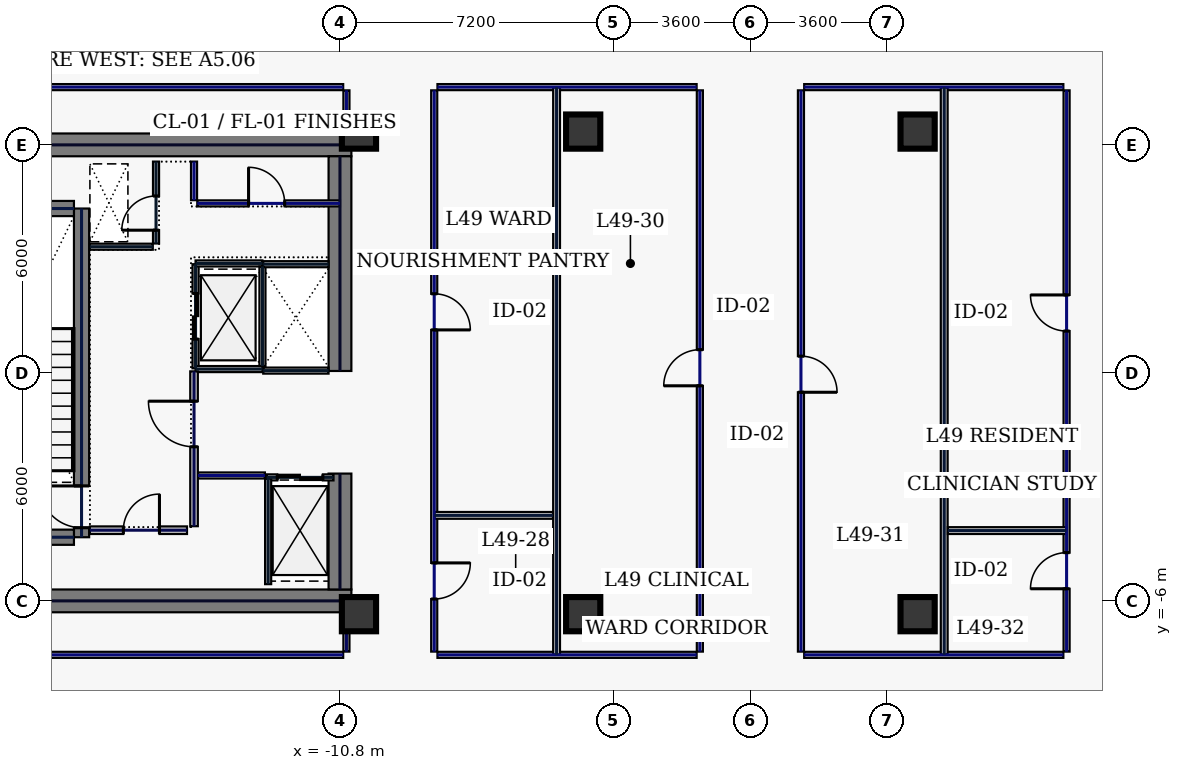
"""IFC4 building model, lengths in metres.
Left out: names, types, materials, properties, quantities, classifications, styles, units other than length and angle.
Written with IfcOpenShell. Run it as: python <this file> out.ifc"""

import sys

from ifc_helpers import new_model, si_unit, direction, frame, frame_2d, origin, origin_2d, place, context, subcontext, project, spatial, rectangle, hollow_rectangle, extrude, element, fill, save


model = new_model("IFC4")
c1 = context("Model", 3, precision=1e-05, world=origin(), true_north=direction((0.0, 1.0)))
c2 = subcontext(c1, "Body", "Model", "MODEL_VIEW")
j1 = project(units=[si_unit("LENGTHUNIT", "METRE"), si_unit("PLANEANGLEUNIT", "RADIAN")], contexts=[c1])
p1 = place(None, origin())
s1 = spatial("IfcSite", under=j1, at=p1, CompositionType="ELEMENT")
p2 = place(p1, origin())
s2 = spatial("IfcBuilding", under=s1, at=p2, CompositionType="ELEMENT")
p3 = place(p2, frame((0.0, 0.0, 214.2)))
s3 = spatial("IfcBuildingStorey", under=s2, at=p3, CompositionType="ELEMENT", Elevation=214.2)
for number, where, z_axis, x_axis in (
    (1, (-22.0, 6.0, 0.0), (0.0, 0.0, 1.0), (1.0, 0.0, 0.0)),
    (2, (-22.0, -6.0, 0.0), (0.0, 0.0, 1.0), (1.0, 0.0, 0.0)),
):
    element("IfcWall", number, at=place(p3, frame(where, z_axis=z_axis, x_axis=x_axis)), inside=s3, PredefinedType="SHEAR", context=c2, shape_type="SweptSolid", body=[
        extrude(rectangle(XDim=11.5, YDim=0.6, at=frame_2d((5.75, 0.0))), origin(), (0.0, 0.0, 1.0), 3.74),
    ])
p4 = place(p3, frame((-10.8, -5.7, 0.0), z_axis=(0.0, 0.0, 1.0), x_axis=(0.0, 1.0, 0.0)))
e3 = element("IfcWall", 3, at=p4, inside=s3, PredefinedType="SHEAR", context=c2, shape_type="SweptSolid", body=[
    extrude(rectangle(XDim=3.05, YDim=0.6, at=frame_2d((1.525, 0.0))), origin(), (0.0, 0.0, 1.0), 3.74),
])
p5 = place(p3, frame((-10.8, 0.05, 0.0), z_axis=(0.0, 0.0, 1.0), x_axis=(0.0, 1.0, 0.0)))
e4 = element("IfcWall", 4, at=p5, inside=s3, PredefinedType="SHEAR", context=c2, shape_type="SweptSolid", body=[
    extrude(rectangle(XDim=5.65, YDim=0.6, at=frame_2d((2.825, 0.0))), origin(), (0.0, 0.0, 1.0), 3.74),
])
p6 = place(p3, frame((-17.6, -4.325, 0.0), z_axis=(0.0, 0.0, 1.0), x_axis=(0.0, 1.0, 0.0)))
e5 = element("IfcWall", 5, at=p6, inside=s3, PredefinedType="SHEAR", context=c2, shape_type="SweptSolid", body=[
    extrude(rectangle(XDim=8.65, YDim=0.4, at=frame_2d((4.325, 0.0))), origin(), (0.0, 0.0, 1.0), 3.74),
])
p7 = place(p6, frame((0.25, 0.0, 0.0)))
e6 = element("IfcOpeningElement", 6, at=p7, cuts=e5, PredefinedType="OPENING", context=c2, shape_type="SweptSolid", body=[
    extrude(rectangle(XDim=1.1, YDim=2.2, at=frame_2d((0.55, 1.1))), frame((0.0, 0.21, 0.0), z_axis=(0.0, -1.0, 0.0), x_axis=(1.0, 0.0, 0.0)), (0.0, 0.0, 1.0), 0.42),
])
for number, where, z_axis, x_axis in (
    (7, (-21.2, -4.325, 0.0), (0.0, 0.0, 1.0), (1.0, 0.0, 0.0)),
    (8, (-21.2, 4.325, 0.0), (0.0, 0.0, 1.0), (1.0, 0.0, 0.0)),
):
    element("IfcWall", number, at=place(p3, frame(where, z_axis=z_axis, x_axis=x_axis)), inside=s3, PredefinedType="SHEAR", context=c2, shape_type="SweptSolid", body=[
        extrude(rectangle(XDim=3.4, YDim=0.4, at=frame_2d((1.7, 0.0))), origin(), (0.0, 0.0, 1.0), 3.74),
    ])
for number, where, z_axis, x_axis in (
    (9, (-10.3, -6.35, 0.0), (0.0, 0.0, 1.0), (1.0, 0.0, 0.0)),
    (10, (-10.3, 6.35, 0.0), (0.0, 0.0, 1.0), (1.0, 0.0, 0.0)),
    (11, (-4.4, -6.35, 0.0), (0.0, 0.0, 1.0), (1.0, 0.0, 0.0)),
    (12, (4.4, -6.35, 0.0), (0.0, 0.0, 1.0), (1.0, 0.0, 0.0)),
    (13, (-4.4, 6.35, 0.0), (0.0, 0.0, 1.0), (1.0, 0.0, 0.0)),
    (14, (4.4, 6.35, 0.0), (0.0, 0.0, 1.0), (1.0, 0.0, 0.0)),
):
    element("IfcColumn", number, at=place(p3, frame(where, z_axis=z_axis, x_axis=x_axis)), inside=s3, PredefinedType="COLUMN", context=c2, shape_type="SweptSolid", body=[
        extrude(hollow_rectangle(XDim=0.9, YDim=0.9, WallThickness=0.04, at=origin_2d()), origin(), (0.0, 0.0, 1.0), 3.74),
    ])
p8 = place(p3, frame((-14.6, 0.12, 0.0), z_axis=(0.0, 0.0, 1.0), x_axis=(0.0, 1.0, 0.0)))
e15 = element("IfcWall", 15, at=p8, inside=s3, PredefinedType="PARTITIONING", context=c2, shape_type="SweptSolid", body=[
    extrude(rectangle(XDim=2.74, YDim=0.16, at=frame_2d((1.37, 0.0))), origin(), (0.0, 0.0, 1.0), 3.74),
])
p9 = place(p8, frame((0.77, 0.0, 0.0)))
e16 = element("IfcOpeningElement", 16, at=p9, cuts=e15, PredefinedType="OPENING", context=c2, shape_type="SweptSolid", body=[
    extrude(rectangle(XDim=1.2, YDim=2.2, at=frame_2d((0.6, 1.1))), frame((0.0, 0.09, 0.0), z_axis=(0.0, -1.0, 0.0), x_axis=(1.0, 0.0, 0.0)), (0.0, 0.0, 1.0), 0.18),
])
for number, where, z_axis, x_axis in (
    (17, (-14.6, 0.1, 0.0), (0.0, 0.0, 1.0), (1.0, 0.0, 0.0)),
    (18, (-14.6, 2.88, 0.0), (0.0, 0.0, 1.0), (1.0, 0.0, 0.0)),
):
    element("IfcWall", number, at=place(p3, frame(where, z_axis=z_axis, x_axis=x_axis)), inside=s3, PredefinedType="PARTITIONING", context=c2, shape_type="SweptSolid", body=[
        extrude(rectangle(XDim=1.76, YDim=0.16, at=frame_2d((0.88, 0.0))), origin(), (0.0, 0.0, 1.0), 3.74),
    ])
p10 = place(p3, frame((-12.84, 0.18, 0.0), z_axis=(0.0, 0.0, 1.0), x_axis=(0.0, 1.0, 0.0)))
e19 = element("IfcWall", 19, at=p10, inside=s3, PredefinedType="PARTITIONING", context=c2, shape_type="SweptSolid", body=[
    extrude(rectangle(XDim=2.62, YDim=0.16, at=frame_2d((1.31, 0.0))), origin(), (0.0, 0.0, 1.0), 3.74),
])
p11 = place(p3, frame((-12.73, -2.75, 0.0), z_axis=(0.0, 0.0, 1.0), x_axis=(1.0, 0.0, 0.0)))
e20 = element("IfcWall", 20, at=p11, inside=s3, PredefinedType="PARTITIONING", context=c2, shape_type="SweptSolid", body=[
    extrude(rectangle(XDim=1.76, YDim=0.16, at=frame_2d((0.88, 0.0))), origin(), (0.0, 0.0, 1.0), 3.74),
])
p12 = place(p11, frame((0.28, 0.0, 0.0)))
e21 = element("IfcOpeningElement", 21, at=p12, cuts=e20, PredefinedType="OPENING", context=c2, shape_type="SweptSolid", body=[
    extrude(rectangle(XDim=1.2, YDim=2.2, at=frame_2d((0.6, 1.1))), frame((0.0, 0.09, 0.0), z_axis=(0.0, -1.0, 0.0), x_axis=(1.0, 0.0, 0.0)), (0.0, 0.0, 1.0), 0.18),
])
for number, where, z_axis, x_axis in (
    (22, (-12.82, 0.06, 0.0), (0.0, 0.0, 1.0), (1.0, 0.0, 0.0)),
    (23, (-12.82, 2.86, 0.0), (0.0, 0.0, 1.0), (1.0, 0.0, 0.0)),
):
    element("IfcWall", number, at=place(p3, frame(where, z_axis=z_axis, x_axis=x_axis)), inside=s3, PredefinedType="PARTITIONING", context=c2, shape_type="SweptSolid", body=[
        extrude(rectangle(XDim=1.72, YDim=0.16, at=frame_2d((0.86, 0.0))), origin(), (0.0, 0.0, 1.0), 3.74),
    ])
p13 = place(p3, frame((-15.64, 3.405, 0.0), z_axis=(0.0, 0.0, 1.0), x_axis=(0.0, 1.0, 0.0)))
e24 = element("IfcWall", 24, at=p13, inside=s3, PredefinedType="PARTITIONING", context=c2, shape_type="SweptSolid", body=[
    extrude(rectangle(XDim=2.155, YDim=0.16, at=frame_2d((1.078, 0.0))), origin(), (0.0, 0.0, 1.0), 3.74),
])
p14 = place(p13, frame((0.35, 0.0, 0.0)))
e25 = element("IfcOpeningElement", 25, at=p14, cuts=e24, PredefinedType="OPENING", context=c2, shape_type="SweptSolid", body=[
    extrude(rectangle(XDim=0.9, YDim=2.2, at=frame_2d((0.45, 1.1))), frame((0.0, 0.09, 0.0), z_axis=(0.0, -1.0, 0.0), x_axis=(1.0, 0.0, 0.0)), (0.0, 0.0, 1.0), 0.18),
])
p15 = place(p3, frame((-17.38, 3.32, 0.0), z_axis=(0.0, 0.0, 1.0), x_axis=(1.0, 0.0, 0.0)))
e26 = element("IfcWall", 26, at=p15, inside=s3, PredefinedType="PARTITIONING", context=c2, shape_type="SweptSolid", body=[
    extrude(rectangle(XDim=1.655, YDim=0.16, at=frame_2d((0.827, 0.0))), origin(), (0.0, 0.0, 1.0), 3.74),
])
p16 = place(p3, frame((-17.38, -4.14, 0.0), z_axis=(0.0, 0.0, 1.0), x_axis=(1.0, 0.0, 0.0)))
e27 = element("IfcWall", 27, at=p16, inside=s3, PredefinedType="SOLIDWALL", context=c2, shape_type="SweptSolid", body=[
    extrude(rectangle(XDim=2.555, YDim=0.2, at=frame_2d((1.277, 0.0))), origin(), (0.0, 0.0, 1.0), 3.74),
])
p17 = place(p16, frame((0.88, 0.0, 0.0)))
e28 = element("IfcOpeningElement", 28, at=p17, cuts=e27, PredefinedType="OPENING", context=c2, shape_type="SweptSolid", body=[
    extrude(rectangle(XDim=0.95, YDim=2.2, at=frame_2d((0.475, 1.1))), frame((0.0, 0.11, 0.0), z_axis=(0.0, -1.0, 0.0), x_axis=(1.0, 0.0, 0.0)), (0.0, 0.0, 1.0), 0.22),
])
p18 = place(p3, frame((-14.535, -2.7, 0.0), z_axis=(0.0, 0.0, 1.0), x_axis=(1.0, 0.0, 0.0)))
e29 = element("IfcWall", 29, at=p18, inside=s3, PredefinedType="PARTITIONING", context=c2, shape_type="SweptSolid", body=[
    extrude(rectangle(XDim=1.76, YDim=0.16, at=frame_2d((0.88, 0.0))), origin(), (0.0, 0.0, 1.0), 3.74),
])
p19 = place(p3, frame((-12.69, -5.56, 0.0), z_axis=(0.0, 0.0, 1.0), x_axis=(0.0, 1.0, 0.0)))
e30 = element("IfcWall", 30, at=p19, inside=s3, PredefinedType="PARTITIONING", context=c2, shape_type="SweptSolid", body=[
    extrude(rectangle(XDim=2.775, YDim=0.16, at=frame_2d((1.388, 0.0))), origin(), (0.0, 0.0, 1.0), 3.74),
])
p20 = place(p3, frame((-14.555, 4.46, 0.0), z_axis=(0.0, 0.0, 1.0), x_axis=(1.0, 0.0, 0.0)))
e31 = element("IfcWall", 31, at=p20, inside=s3, PredefinedType="PARTITIONING", context=c2, shape_type="SweptSolid", body=[
    extrude(rectangle(XDim=3.755, YDim=0.16, at=frame_2d((1.877, 0.0))), origin(), (0.0, 0.0, 1.0), 3.74),
])
p21 = place(p20, frame((1.35, 0.0, 0.0)))
e32 = element("IfcOpeningElement", 32, at=p21, cuts=e31, PredefinedType="OPENING", context=c2, shape_type="SweptSolid", body=[
    extrude(rectangle(XDim=0.95, YDim=2.2, at=frame_2d((0.475, 1.1))), frame((0.0, 0.09, 0.0), z_axis=(0.0, -1.0, 0.0), x_axis=(1.0, 0.0, 0.0)), (0.0, 0.0, 1.0), 0.18),
])
p22 = place(p3, frame((-14.64, 4.545, 0.0), z_axis=(0.0, 0.0, 1.0), x_axis=(0.0, 1.0, 0.0)))
e33 = element("IfcWall", 33, at=p22, inside=s3, PredefinedType="PARTITIONING", context=c2, shape_type="SweptSolid", body=[
    extrude(rectangle(XDim=1.015, YDim=0.16, at=frame_2d((0.508, 0.0))), origin(), (0.0, 0.0, 1.0), 3.74),
])
p23 = place(p3, frame((-14.64, -4.035, 0.0), z_axis=(0.0, 0.0, 1.0), x_axis=(0.0, 1.0, 0.0)))
e34 = element("IfcWall", 34, at=p23, inside=s3, PredefinedType="SOLIDWALL", context=c2, shape_type="SweptSolid", body=[
    extrude(rectangle(XDim=4.075, YDim=0.2, at=frame_2d((2.038, 0.0))), origin(), (0.0, 0.0, 1.0), 3.74),
])
p24 = place(p23, frame((2.09, 0.0, 0.0)))
e35 = element("IfcOpeningElement", 35, at=p24, cuts=e34, PredefinedType="OPENING", context=c2, shape_type="SweptSolid", body=[
    extrude(rectangle(XDim=1.2, YDim=2.2, at=frame_2d((0.6, 1.1))), frame((0.0, 0.11, 0.0), z_axis=(0.0, -1.0, 0.0), x_axis=(1.0, 0.0, 0.0)), (0.0, 0.0, 1.0), 0.22),
])
p25 = place(p3, frame((-24.815, -7.42, 0.0), z_axis=(0.0, 0.0, 1.0), x_axis=(1.0, 0.0, 0.0)))
e36 = element("IfcWall", 36, at=p25, inside=s3, PredefinedType="PARTITIONING", context=c2, shape_type="SweptSolid", body=[
    extrude(rectangle(XDim=14.1, YDim=0.16, at=frame_2d((7.05, 0.0))), origin(), (0.0, 0.0, 1.0), 3.74),
])
p26 = place(p3, frame((-10.63, -7.335, 0.0), z_axis=(0.0, 0.0, 1.0), x_axis=(0.0, 1.0, 0.0)))
e37 = element("IfcWall", 37, at=p26, inside=s3, PredefinedType="PARTITIONING", context=c2, shape_type="SweptSolid", body=[
    extrude(rectangle(XDim=0.915, YDim=0.16, at=frame_2d((0.458, 0.0))), origin(), (0.0, 0.0, 1.0), 1.535),
])
p27 = place(p3, frame((-10.63, 6.42, 0.0), z_axis=(0.0, 0.0, 1.0), x_axis=(0.0, 1.0, 0.0)))
e38 = element("IfcWall", 38, at=p27, inside=s3, PredefinedType="PARTITIONING", context=c2, shape_type="SweptSolid", body=[
    extrude(rectangle(XDim=1.015, YDim=0.16, at=frame_2d((0.508, 0.0))), origin(), (0.0, 0.0, 1.0), 3.74),
])
p28 = place(p3, frame((-10.715, 7.52, 0.0), z_axis=(0.0, 0.0, 1.0), x_axis=(-1.0, 0.0, 0.0)))
e39 = element("IfcWall", 39, at=p28, inside=s3, PredefinedType="PARTITIONING", context=c2, shape_type="SweptSolid", body=[
    extrude(rectangle(XDim=14.1, YDim=0.16, at=frame_2d((7.05, 0.0))), origin(), (0.0, 0.0, 1.0), 3.74),
])
p29 = place(p3, frame((8.235, 7.52, 0.0), z_axis=(0.0, 0.0, 1.0), x_axis=(-1.0, 0.0, 0.0)))
e40 = element("IfcWall", 40, at=p29, inside=s3, PredefinedType="PARTITIONING", context=c2, shape_type="SweptSolid", body=[
    extrude(rectangle(XDim=6.82, YDim=0.16, at=frame_2d((3.41, 0.0))), origin(), (0.0, 0.0, 1.0), 3.74),
])
p30 = place(p3, frame((1.33, 7.435, 0.0), z_axis=(0.0, 0.0, 1.0), x_axis=(0.0, -1.0, 0.0)))
e41 = element("IfcWall", 41, at=p30, inside=s3, PredefinedType="PARTITIONING", context=c2, shape_type="SweptSolid", body=[
    extrude(rectangle(XDim=14.77, YDim=0.16, at=frame_2d((7.385, 0.0))), origin(), (0.0, 0.0, 1.0), 3.74),
])
p31 = place(p30, frame((6.995, 0.0, 0.0)))
e42 = element("IfcOpeningElement", 42, at=p31, cuts=e41, PredefinedType="OPENING", context=c2, shape_type="SweptSolid", body=[
    extrude(rectangle(XDim=0.95, YDim=2.2, at=frame_2d((0.475, 1.1))), frame((0.0, 0.09, 0.0), z_axis=(0.0, -1.0, 0.0), x_axis=(1.0, 0.0, 0.0)), (0.0, 0.0, 1.0), 0.18),
])
p32 = place(p3, frame((1.415, -7.42, 0.0), z_axis=(0.0, 0.0, 1.0), x_axis=(1.0, 0.0, 0.0)))
e43 = element("IfcWall", 43, at=p32, inside=s3, PredefinedType="PARTITIONING", context=c2, shape_type="SweptSolid", body=[
    extrude(rectangle(XDim=6.82, YDim=0.16, at=frame_2d((3.41, 0.0))), origin(), (0.0, 0.0, 1.0), 3.74),
])
p33 = place(p3, frame((8.32, -7.335, 0.0), z_axis=(0.0, 0.0, 1.0), x_axis=(0.0, 1.0, 0.0)))
e44 = element("IfcWall", 44, at=p33, inside=s3, PredefinedType="PARTITIONING", context=c2, shape_type="SweptSolid", body=[
    extrude(rectangle(XDim=14.77, YDim=0.16, at=frame_2d((7.385, 0.0))), origin(), (0.0, 0.0, 1.0), 3.74),
])
p34 = place(p33, frame((1.654, 0.0, 0.0)))
e45 = element("IfcOpeningElement", 45, at=p34, cuts=e44, PredefinedType="OPENING", context=c2, shape_type="SweptSolid", body=[
    extrude(rectangle(XDim=0.95, YDim=2.2, at=frame_2d((0.475, 1.1))), frame((0.0, 0.09, 0.0), z_axis=(0.0, -1.0, 0.0), x_axis=(1.0, 0.0, 0.0)), (0.0, 0.0, 1.0), 0.18),
])
p35 = place(p33, frame((8.436, 0.0, 0.0)))
e46 = element("IfcOpeningElement", 46, at=p35, cuts=e44, PredefinedType="OPENING", context=c2, shape_type="SweptSolid", body=[
    extrude(rectangle(XDim=0.95, YDim=2.2, at=frame_2d((0.475, 1.1))), frame((0.0, 0.09, 0.0), z_axis=(0.0, -1.0, 0.0), x_axis=(1.0, 0.0, 0.0)), (0.0, 0.0, 1.0), 0.18),
])
p36 = place(p3, frame((-1.33, -7.335, 0.0), z_axis=(0.0, 0.0, 1.0), x_axis=(0.0, 1.0, 0.0)))
e47 = element("IfcWall", 47, at=p36, inside=s3, PredefinedType="PARTITIONING", context=c2, shape_type="SweptSolid", body=[
    extrude(rectangle(XDim=14.77, YDim=0.16, at=frame_2d((7.385, 0.0))), origin(), (0.0, 0.0, 1.0), 3.74),
])
p37 = place(p36, frame((6.995, 0.0, 0.0)))
e48 = element("IfcOpeningElement", 48, at=p37, cuts=e47, PredefinedType="OPENING", context=c2, shape_type="SweptSolid", body=[
    extrude(rectangle(XDim=0.95, YDim=2.2, at=frame_2d((0.475, 1.1))), frame((0.0, 0.09, 0.0), z_axis=(0.0, -1.0, 0.0), x_axis=(1.0, 0.0, 0.0)), (0.0, 0.0, 1.0), 0.18),
])
p38 = place(p3, frame((-1.415, 7.52, 0.0), z_axis=(0.0, 0.0, 1.0), x_axis=(-1.0, 0.0, 0.0)))
e49 = element("IfcWall", 49, at=p38, inside=s3, PredefinedType="PARTITIONING", context=c2, shape_type="SweptSolid", body=[
    extrude(rectangle(XDim=6.82, YDim=0.16, at=frame_2d((3.41, 0.0))), origin(), (0.0, 0.0, 1.0), 3.74),
])
p39 = place(p3, frame((-8.32, 7.435, 0.0), z_axis=(0.0, 0.0, 1.0), x_axis=(0.0, -1.0, 0.0)))
e50 = element("IfcWall", 50, at=p39, inside=s3, PredefinedType="PARTITIONING", context=c2, shape_type="SweptSolid", body=[
    extrude(rectangle(XDim=14.77, YDim=0.16, at=frame_2d((7.385, 0.0))), origin(), (0.0, 0.0, 1.0), 3.74),
])
p40 = place(p39, frame((12.436, 0.0, 0.0)))
e51 = element("IfcOpeningElement", 51, at=p40, cuts=e50, PredefinedType="OPENING", context=c2, shape_type="SweptSolid", body=[
    extrude(rectangle(XDim=0.95, YDim=2.2, at=frame_2d((0.475, 1.1))), frame((0.0, 0.09, 0.0), z_axis=(0.0, -1.0, 0.0), x_axis=(1.0, 0.0, 0.0)), (0.0, 0.0, 1.0), 0.18),
])
p41 = place(p39, frame((5.354, 0.0, 0.0)))
e52 = element("IfcOpeningElement", 52, at=p41, cuts=e50, PredefinedType="OPENING", context=c2, shape_type="SweptSolid", body=[
    extrude(rectangle(XDim=0.95, YDim=2.2, at=frame_2d((0.475, 1.1))), frame((0.0, 0.09, 0.0), z_axis=(0.0, -1.0, 0.0), x_axis=(1.0, 0.0, 0.0)), (0.0, 0.0, 1.0), 0.18),
])
p42 = place(p3, frame((-8.235, -7.42, 0.0), z_axis=(0.0, 0.0, 1.0), x_axis=(1.0, 0.0, 0.0)))
e53 = element("IfcWall", 53, at=p42, inside=s3, PredefinedType="PARTITIONING", context=c2, shape_type="SweptSolid", body=[
    extrude(rectangle(XDim=6.82, YDim=0.16, at=frame_2d((3.41, 0.0))), origin(), (0.0, 0.0, 1.0), 3.74),
])
for number, where, z_axis, x_axis in (
    (54, (-5.1, -7.415, 0.0), (0.0, 0.0, 1.0), (0.0, 1.0, 0.0)),
    (55, (5.1, -7.415, 0.0), (0.0, 0.0, 1.0), (0.0, 1.0, 0.0)),
):
    element("IfcWall", number, at=place(p3, frame(where, z_axis=z_axis, x_axis=x_axis)), inside=s3, PredefinedType="PARTITIONING", context=c2, shape_type="SweptSolid", body=[
        extrude(rectangle(XDim=14.93, YDim=0.18, at=frame_2d((7.465, 0.0))), origin(), (0.0, 0.0, 1.0), 3.74),
    ])
for number, where, z_axis, x_axis in (
    (56, (-8.315, -3.75, 0.0), (0.0, 0.0, 1.0), (1.0, 0.0, 0.0)),
    (57, (5.195, -4.15, 0.0), (0.0, 0.0, 1.0), (1.0, 0.0, 0.0)),
):
    element("IfcWall", number, at=place(p3, frame(where, z_axis=z_axis, x_axis=x_axis)), inside=s3, PredefinedType="PARTITIONING", context=c2, shape_type="SweptSolid", body=[
        extrude(rectangle(XDim=3.12, YDim=0.18, at=frame_2d((1.56, 0.0))), origin(), (0.0, 0.0, 1.0), 3.74),
    ])
p43 = place(p7, origin())
e58 = element("IfcDoor", 58, at=p43, inside=s3, OperationType="SINGLE_SWING_RIGHT", PredefinedType="DOOR", context=c2, shape_type="SweptSolid", body=[
    extrude(rectangle(XDim=1.1, YDim=2.2, at=frame_2d((0.55, 1.1))), frame((0.0, 0.025, 0.0), z_axis=(0.0, -1.0, 0.0), x_axis=(1.0, 0.0, 0.0)), (0.0, 0.0, 1.0), 0.05),
])
fill(e6, e58)
p44 = place(p9, origin())
e59 = element("IfcDoor", 59, at=p44, inside=s3, OperationType="SLIDING_TO_LEFT", PredefinedType="DOOR", context=c2, shape_type="SweptSolid", body=[
    extrude(rectangle(XDim=1.2, YDim=2.2, at=frame_2d((0.6, 1.1))), frame((0.0, 0.025, 0.0), z_axis=(0.0, -1.0, 0.0), x_axis=(1.0, 0.0, 0.0)), (0.0, 0.0, 1.0), 0.05),
])
fill(e16, e59)
p45 = place(p12, origin())
e60 = element("IfcDoor", 60, at=p45, inside=s3, OperationType="SLIDING_TO_LEFT", PredefinedType="DOOR", context=c2, shape_type="SweptSolid", body=[
    extrude(rectangle(XDim=1.2, YDim=2.2, at=frame_2d((0.6, 1.1))), frame((0.0, 0.025, 0.0), z_axis=(0.0, -1.0, 0.0), x_axis=(1.0, 0.0, 0.0)), (0.0, 0.0, 1.0), 0.05),
])
fill(e21, e60)
p46 = place(p14, origin())
e61 = element("IfcDoor", 61, at=p46, inside=s3, OperationType="SINGLE_SWING_LEFT", PredefinedType="DOOR", context=c2, shape_type="SweptSolid", body=[
    extrude(rectangle(XDim=0.9, YDim=2.2, at=frame_2d((0.45, 1.1))), frame((0.0, 0.025, 0.0), z_axis=(0.0, -1.0, 0.0), x_axis=(1.0, 0.0, 0.0)), (0.0, 0.0, 1.0), 0.05),
])
fill(e25, e61)
p47 = place(p17, origin())
e62 = element("IfcDoor", 62, at=p47, inside=s3, OperationType="SINGLE_SWING_RIGHT", PredefinedType="DOOR", context=c2, shape_type="SweptSolid", body=[
    extrude(rectangle(XDim=0.95, YDim=2.2, at=frame_2d((0.475, 1.1))), frame((0.0, 0.025, 0.0), z_axis=(0.0, -1.0, 0.0), x_axis=(1.0, 0.0, 0.0)), (0.0, 0.0, 1.0), 0.05),
])
fill(e28, e62)
p48 = place(p21, origin())
e63 = element("IfcDoor", 63, at=p48, inside=s3, OperationType="SINGLE_SWING_LEFT", PredefinedType="DOOR", context=c2, shape_type="SweptSolid", body=[
    extrude(rectangle(XDim=0.95, YDim=2.2, at=frame_2d((0.475, 1.1))), frame((0.0, 0.025, 0.0), z_axis=(0.0, -1.0, 0.0), x_axis=(1.0, 0.0, 0.0)), (0.0, 0.0, 1.0), 0.05),
])
fill(e32, e63)
p49 = place(p24, origin())
e64 = element("IfcDoor", 64, at=p49, inside=s3, OperationType="SINGLE_SWING_RIGHT", PredefinedType="DOOR", context=c2, shape_type="SweptSolid", body=[
    extrude(rectangle(XDim=1.2, YDim=2.2, at=frame_2d((0.6, 1.1))), frame((0.0, 0.025, 0.0), z_axis=(0.0, -1.0, 0.0), x_axis=(1.0, 0.0, 0.0)), (0.0, 0.0, 1.0), 0.05),
])
fill(e35, e64)
p50 = place(p40, origin())
e65 = element("IfcDoor", 65, at=p50, inside=s3, OperationType="SINGLE_SWING_LEFT", PredefinedType="DOOR", context=c2, shape_type="SweptSolid", body=[
    extrude(rectangle(XDim=0.95, YDim=2.2, at=frame_2d((0.475, 1.1))), frame((0.0, 0.025, 0.0), z_axis=(0.0, -1.0, 0.0), x_axis=(1.0, 0.0, 0.0)), (0.0, 0.0, 1.0), 0.05),
])
fill(e51, e65)
p51 = place(p41, origin())
e66 = element("IfcDoor", 66, at=p51, inside=s3, OperationType="SINGLE_SWING_RIGHT", PredefinedType="DOOR", context=c2, shape_type="SweptSolid", body=[
    extrude(rectangle(XDim=0.95, YDim=2.2, at=frame_2d((0.475, 1.1))), frame((0.0, 0.025, 0.0), z_axis=(0.0, -1.0, 0.0), x_axis=(1.0, 0.0, 0.0)), (0.0, 0.0, 1.0), 0.05),
])
fill(e52, e66)
p52 = place(p37, origin())
e67 = element("IfcDoor", 67, at=p52, inside=s3, OperationType="SINGLE_SWING_LEFT", PredefinedType="DOOR", context=c2, shape_type="SweptSolid", body=[
    extrude(rectangle(XDim=0.95, YDim=2.2, at=frame_2d((0.475, 1.1))), frame((0.0, 0.025, 0.0), z_axis=(0.0, -1.0, 0.0), x_axis=(1.0, 0.0, 0.0)), (0.0, 0.0, 1.0), 0.05),
])
fill(e48, e67)
p53 = place(p31, origin())
e68 = element("IfcDoor", 68, at=p53, inside=s3, OperationType="SINGLE_SWING_RIGHT", PredefinedType="DOOR", context=c2, shape_type="SweptSolid", body=[
    extrude(rectangle(XDim=0.95, YDim=2.2, at=frame_2d((0.475, 1.1))), frame((0.0, 0.025, 0.0), z_axis=(0.0, -1.0, 0.0), x_axis=(1.0, 0.0, 0.0)), (0.0, 0.0, 1.0), 0.05),
])
fill(e42, e68)
p54 = place(p34, origin())
e69 = element("IfcDoor", 69, at=p54, inside=s3, OperationType="SINGLE_SWING_LEFT", PredefinedType="DOOR", context=c2, shape_type="SweptSolid", body=[
    extrude(rectangle(XDim=0.95, YDim=2.2, at=frame_2d((0.475, 1.1))), frame((0.0, 0.025, 0.0), z_axis=(0.0, -1.0, 0.0), x_axis=(1.0, 0.0, 0.0)), (0.0, 0.0, 1.0), 0.05),
])
fill(e45, e69)
p55 = place(p35, origin())
e70 = element("IfcDoor", 70, at=p55, inside=s3, OperationType="SINGLE_SWING_RIGHT", PredefinedType="DOOR", context=c2, shape_type="SweptSolid", body=[
    extrude(rectangle(XDim=0.95, YDim=2.2, at=frame_2d((0.475, 1.1))), frame((0.0, 0.025, 0.0), z_axis=(0.0, -1.0, 0.0), x_axis=(1.0, 0.0, 0.0)), (0.0, 0.0, 1.0), 0.05),
])
fill(e46, e70)
save(model, sys.argv[1])
